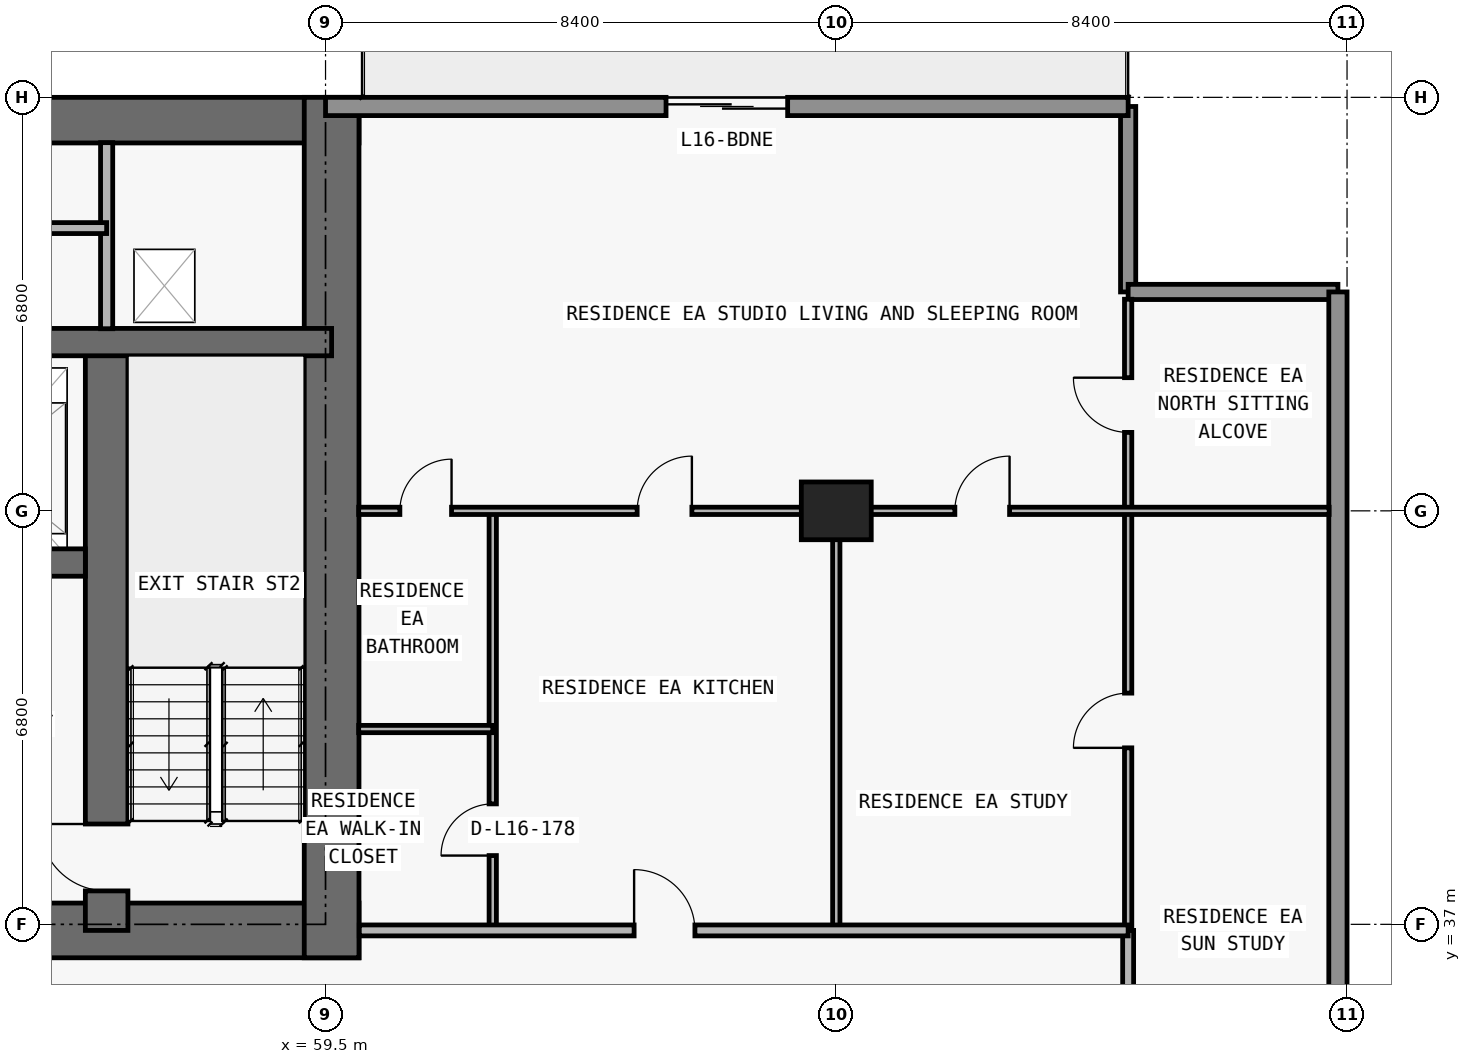
"""IFC4 building model, lengths in metres.
Left out: names, types, materials, properties, quantities, classifications, styles, units other than length and angle.
Written with IfcOpenShell. Run it as: python <this file> out.ifc"""

import sys

from ifc_helpers import new_model, si_unit, direction, frame, frame_2d, origin, origin_2d, place, context, subcontext, project, spatial, rectangle, extrude, element, fill, save


model = new_model("IFC4")
c1 = context("Model", 3, precision=1e-05, world=origin(), true_north=direction((0.0, 1.0)))
c2 = subcontext(c1, "Body", "Model", "MODEL_VIEW")
j1 = project(units=[si_unit("LENGTHUNIT", "METRE"), si_unit("PLANEANGLEUNIT", "RADIAN")], contexts=[c1])
p1 = place(None, origin())
s1 = spatial("IfcSite", under=j1, at=p1, CompositionType="ELEMENT")
p2 = place(p1, origin())
s2 = spatial("IfcBuilding", under=s1, at=p2, CompositionType="ELEMENT")
p3 = place(p2, frame((0.0, 0.0, 63.0)))
s3 = spatial("IfcBuildingStorey", under=s2, at=p3, CompositionType="ELEMENT", Elevation=63.0)
p4 = place(p3, frame((67.9, 43.8, 0.0), z_axis=(0.0, 0.0, 1.0), x_axis=(1.0, 0.0, 0.0)))
e1 = element("IfcColumn", 1, at=p4, inside=s3, PredefinedType="COLUMN", context=c2, shape_type="SweptSolid", body=[
    extrude(rectangle(XDim=1.15, YDim=0.95, at=origin_2d()), origin(), (0.0, 0.0, 1.0), 3.05),
])
p5 = place(p3, frame((17.75, 36.9, 0.0), z_axis=(0.0, 0.0, 1.0), x_axis=(1.0, 0.0, 0.0)))
e2 = element("IfcWall", 2, at=p5, inside=s3, PredefinedType="SHEAR", context=c2, shape_type="SweptSolid", body=[
    extrude(rectangle(XDim=42.3, YDim=0.9, at=frame_2d((21.15, 0.0))), origin(), (0.0, 0.0, 1.0), 3.05),
])
p6 = place(p5, frame((14.55, 0.0, 0.0)))
e3 = element("IfcOpeningElement", 3, at=p6, cuts=e2, PredefinedType="OPENING", context=c2, shape_type="SweptSolid", body=[
    extrude(rectangle(XDim=1.1, YDim=2.15, at=frame_2d((0.55, 1.075))), frame((0.0, 0.46, 0.0), z_axis=(0.0, -1.0, 0.0), x_axis=(1.0, 0.0, 0.0)), (0.0, 0.0, 1.0), 0.92),
])
p7 = place(p5, frame((6.4, 0.0, 0.0)))
e4 = element("IfcOpeningElement", 4, at=p7, cuts=e2, PredefinedType="OPENING", context=c2, shape_type="SweptSolid", body=[
    extrude(rectangle(XDim=1.05, YDim=2.15, at=frame_2d((0.525, 1.075))), frame((0.0, 0.46, 0.0), z_axis=(0.0, -1.0, 0.0), x_axis=(1.0, 0.0, 0.0)), (0.0, 0.0, 1.0), 0.92),
])
p8 = place(p5, frame((34.9, 0.0, 0.0)))
e5 = element("IfcOpeningElement", 5, at=p8, cuts=e2, PredefinedType="OPENING", context=c2, shape_type="SweptSolid", body=[
    extrude(rectangle(XDim=1.05, YDim=2.15, at=frame_2d((0.525, 1.075))), frame((0.0, 0.46, 0.0), z_axis=(0.0, -1.0, 0.0), x_axis=(1.0, 0.0, 0.0)), (0.0, 0.0, 1.0), 0.92),
])
p9 = place(p5, frame((11.012, 0.0, 0.0)))
e6 = element("IfcOpeningElement", 6, at=p9, cuts=e2, PredefinedType="OPENING", context=c2, shape_type="SweptSolid", body=[
    extrude(rectangle(XDim=1.05, YDim=2.15, at=frame_2d((0.525, 1.075))), frame((0.0, 0.46, 0.0), z_axis=(0.0, -1.0, 0.0), x_axis=(1.0, 0.0, 0.0)), (0.0, 0.0, 1.0), 0.92),
])
p10 = place(p5, frame((24.25, 0.0, 0.0)))
e7 = element("IfcOpeningElement", 7, at=p10, cuts=e2, PredefinedType="OPENING", context=c2, shape_type="SweptSolid", body=[
    extrude(rectangle(XDim=1.05, YDim=2.15, at=frame_2d((0.525, 1.075))), frame((0.0, 0.46, 0.0), z_axis=(0.0, -1.0, 0.0), x_axis=(1.0, 0.0, 0.0)), (0.0, 0.0, 1.0), 0.92),
])
p11 = place(p3, frame((17.75, 50.225, 0.0), z_axis=(0.0, 0.0, 1.0), x_axis=(1.0, 0.0, 0.0)))
e8 = element("IfcWall", 8, at=p11, inside=s3, PredefinedType="SHEAR", context=c2, shape_type="SweptSolid", body=[
    extrude(rectangle(XDim=42.3, YDim=0.75, at=frame_2d((21.15, 0.0))), origin(), (0.0, 0.0, 1.0), 3.05),
])
p12 = place(p3, frame((59.6, 36.45, 0.0), z_axis=(0.0, 0.0, 1.0), x_axis=(0.0, 1.0, 0.0)))
e9 = element("IfcWall", 9, at=p12, inside=s3, PredefinedType="SHEAR", context=c2, shape_type="SweptSolid", body=[
    extrude(rectangle(XDim=14.15, YDim=0.9, at=frame_2d((7.075, 0.0))), origin(), (0.0, 0.0, 1.0), 3.05),
])
p13 = place(p3, frame((55.9, 36.9, 0.0), z_axis=(0.0, 0.0, 1.0), x_axis=(0.0, 1.0, 0.0)))
e10 = element("IfcWall", 10, at=p13, inside=s3, PredefinedType="SHEAR", context=c2, shape_type="SweptSolid", body=[
    extrude(rectangle(XDim=9.675, YDim=0.7, at=frame_2d((4.837, 0.0))), origin(), (0.0, 0.0, 1.0), 3.05),
])
p14 = place(p13, frame((0.65, 0.0, 0.0)))
e11 = element("IfcOpeningElement", 11, at=p14, cuts=e10, PredefinedType="OPENING", context=c2, shape_type="SweptSolid", body=[
    extrude(rectangle(XDim=1.1, YDim=2.15, at=frame_2d((0.55, 1.075))), frame((0.0, 0.36, 0.0), z_axis=(0.0, -1.0, 0.0), x_axis=(1.0, 0.0, 0.0)), (0.0, 0.0, 1.0), 0.72),
])
p15 = place(p3, frame((22.25, 42.95, 0.0), z_axis=(0.0, 0.0, 1.0), x_axis=(1.0, 0.0, 0.0)))
e12 = element("IfcWall", 12, at=p15, inside=s3, PredefinedType="SHEAR", context=c2, shape_type="SweptSolid", body=[
    extrude(rectangle(XDim=33.3, YDim=0.45, at=frame_2d((16.65, 0.0))), origin(), (0.0, 0.0, 1.0), 3.05),
])
p16 = place(p15, frame((1.05, 0.0, 0.0)))
e13 = element("IfcOpeningElement", 13, at=p16, cuts=e12, PredefinedType="OPENING", context=c2, shape_type="SweptSolid", body=[
    extrude(rectangle(XDim=1.2, YDim=2.2, at=frame_2d((0.6, 1.1))), frame((0.0, 0.235, 0.0), z_axis=(0.0, -1.0, 0.0), x_axis=(1.0, 0.0, 0.0)), (0.0, 0.0, 1.0), 0.47),
])
p17 = place(p15, frame((31.05, 0.0, 0.0)))
e14 = element("IfcOpeningElement", 14, at=p17, cuts=e12, PredefinedType="OPENING", context=c2, shape_type="SweptSolid", body=[
    extrude(rectangle(XDim=1.2, YDim=2.2, at=frame_2d((0.6, 1.1))), frame((0.0, 0.235, 0.0), z_axis=(0.0, -1.0, 0.0), x_axis=(1.0, 0.0, 0.0)), (0.0, 0.0, 1.0), 0.47),
])
p18 = place(p15, frame((13.5, 0.0, 0.0)))
e15 = element("IfcOpeningElement", 15, at=p18, cuts=e12, PredefinedType="OPENING", context=c2, shape_type="SweptSolid", body=[
    extrude(rectangle(XDim=1.1, YDim=2.2, at=frame_2d((0.55, 1.1))), frame((0.0, 0.235, 0.0), z_axis=(0.0, -1.0, 0.0), x_axis=(1.0, 0.0, 0.0)), (0.0, 0.0, 1.0), 0.47),
])
p19 = place(p15, frame((16.1, 0.0, 0.0)))
e16 = element("IfcOpeningElement", 16, at=p19, cuts=e12, PredefinedType="OPENING", context=c2, shape_type="SweptSolid", body=[
    extrude(rectangle(XDim=1.1, YDim=2.2, at=frame_2d((0.55, 1.1))), frame((0.0, 0.235, 0.0), z_axis=(0.0, -1.0, 0.0), x_axis=(1.0, 0.0, 0.0)), (0.0, 0.0, 1.0), 0.47),
])
p20 = place(p15, frame((18.7, 0.0, 0.0)))
e17 = element("IfcOpeningElement", 17, at=p20, cuts=e12, PredefinedType="OPENING", context=c2, shape_type="SweptSolid", body=[
    extrude(rectangle(XDim=1.1, YDim=2.2, at=frame_2d((0.55, 1.1))), frame((0.0, 0.235, 0.0), z_axis=(0.0, -1.0, 0.0), x_axis=(1.0, 0.0, 0.0)), (0.0, 0.0, 1.0), 0.47),
])
p21 = place(p15, frame((3.625, 0.0, 0.0)))
e18 = element("IfcOpeningElement", 18, at=p21, cuts=e12, PredefinedType="OPENING", context=c2, shape_type="SweptSolid", body=[
    extrude(rectangle(XDim=1.05, YDim=2.15, at=frame_2d((0.525, 1.075))), frame((0.0, 0.235, 0.0), z_axis=(0.0, -1.0, 0.0), x_axis=(1.0, 0.0, 0.0)), (0.0, 0.0, 1.0), 0.47),
])
p22 = place(p15, frame((28.675, 0.0, 0.0)))
e19 = element("IfcOpeningElement", 19, at=p22, cuts=e12, PredefinedType="OPENING", context=c2, shape_type="SweptSolid", body=[
    extrude(rectangle(XDim=1.05, YDim=2.15, at=frame_2d((0.525, 1.075))), frame((0.0, 0.235, 0.0), z_axis=(0.0, -1.0, 0.0), x_axis=(1.0, 0.0, 0.0)), (0.0, 0.0, 1.0), 0.47),
])
p23 = place(p3, frame((18.2, 46.575, 0.0), z_axis=(0.0, 0.0, 1.0), x_axis=(1.0, 0.0, 0.0)))
e20 = element("IfcWall", 20, at=p23, inside=s3, PredefinedType="SHEAR", context=c2, shape_type="SweptSolid", body=[
    extrude(rectangle(XDim=41.4, YDim=0.45, at=frame_2d((20.7, 0.0))), origin(), (0.0, 0.0, 1.0), 3.05),
])
p24 = place(p23, frame((7.675, 0.0, 0.0)))
e21 = element("IfcOpeningElement", 21, at=p24, cuts=e20, PredefinedType="OPENING", context=c2, shape_type="SweptSolid", body=[
    extrude(rectangle(XDim=1.05, YDim=2.15, at=frame_2d((0.525, 1.075))), frame((0.0, 0.235, 0.0), z_axis=(0.0, -1.0, 0.0), x_axis=(1.0, 0.0, 0.0)), (0.0, 0.0, 1.0), 0.47),
])
p25 = place(p23, frame((32.725, 0.0, 0.0)))
e22 = element("IfcOpeningElement", 22, at=p25, cuts=e20, PredefinedType="OPENING", context=c2, shape_type="SweptSolid", body=[
    extrude(rectangle(XDim=1.05, YDim=2.15, at=frame_2d((0.525, 1.075))), frame((0.0, 0.235, 0.0), z_axis=(0.0, -1.0, 0.0), x_axis=(1.0, 0.0, 0.0)), (0.0, 0.0, 1.0), 0.47),
])
p26 = place(p3, frame((72.7, 50.45, 0.0), z_axis=(0.0, 0.0, 1.0), x_axis=(0.0, -1.0, 0.0)))
e23 = element("IfcWall", 23, at=p26, inside=s3, PredefinedType="ELEMENTEDWALL", context=c2, shape_type="SweptSolid", body=[
    extrude(rectangle(XDim=3.05, YDim=0.25, at=frame_2d((1.525, 0.0))), origin(), (0.0, 0.0, 1.0), 3.05),
])
p27 = place(p3, frame((72.7, 47.4, 0.0), z_axis=(0.0, 0.0, 1.0), x_axis=(1.0, 0.0, 0.0)))
e24 = element("IfcWall", 24, at=p27, inside=s3, PredefinedType="ELEMENTEDWALL", context=c2, shape_type="SweptSolid", body=[
    extrude(rectangle(XDim=3.45, YDim=0.25, at=frame_2d((1.725, 0.0))), origin(), (0.0, 0.0, 1.0), 3.05),
])
p28 = place(p3, frame((76.15, 47.4, 0.0), z_axis=(0.0, 0.0, 1.0), x_axis=(0.0, -1.0, 0.0)))
e25 = element("IfcWall", 25, at=p28, inside=s3, PredefinedType="STANDARD", context=c2, shape_type="SweptSolid", body=[
    extrude(rectangle(XDim=20.6, YDim=0.3, at=frame_2d((10.3, 0.0))), origin(), (0.0, 0.0, 1.0), 3.05),
])
p29 = place(p3, frame((59.5, 50.45, 0.0), z_axis=(0.0, 0.0, 1.0), x_axis=(1.0, 0.0, 0.0)))
e26 = element("IfcWall", 26, at=p29, inside=s3, PredefinedType="STANDARD", context=c2, shape_type="SweptSolid", body=[
    extrude(rectangle(XDim=13.2, YDim=0.3, at=frame_2d((6.6, 0.0))), origin(), (0.0, 0.0, 1.0), 3.05),
])
p30 = place(p29, frame((5.6, 0.0, 0.0)))
e27 = element("IfcOpeningElement", 27, at=p30, cuts=e26, PredefinedType="OPENING", context=c2, shape_type="SweptSolid", body=[
    extrude(rectangle(XDim=2.0, YDim=2.3, at=frame_2d((1.0, 1.15))), frame((0.0, 0.16, 0.0), z_axis=(0.0, -1.0, 0.0), x_axis=(1.0, 0.0, 0.0)), (0.0, 0.0, 1.0), 0.32),
])
p31 = place(p3, frame((55.9, 46.795, 0.0), z_axis=(0.0, 0.0, 1.0), x_axis=(0.0, 1.0, 0.0)))
e28 = element("IfcWall", 28, at=p31, inside=s3, PredefinedType="PARTITIONING", context=c2, shape_type="SweptSolid", body=[
    extrude(rectangle(XDim=3.06, YDim=0.2, at=frame_2d((1.53, 0.0))), origin(), (0.0, 0.0, 1.0), 3.05),
])
p32 = place(p3, frame((62.25, 36.9, 0.0), z_axis=(0.0, 0.0, 1.0), x_axis=(0.0, 1.0, 0.0)))
e29 = element("IfcWall", 29, at=p32, inside=s3, PredefinedType="PARTITIONING", context=c2, shape_type="SweptSolid", body=[
    extrude(rectangle(XDim=6.9, YDim=0.12, at=frame_2d((3.45, 0.0))), origin(), (0.0, 0.0, 1.0), 2.486),
])
p33 = place(p32, frame((1.231, 0.0, 0.0)))
e30 = element("IfcOpeningElement", 30, at=p33, cuts=e29, PredefinedType="OPENING", context=c2, shape_type="SweptSolid", body=[
    extrude(rectangle(XDim=0.85, YDim=2.1, at=frame_2d((0.425, 1.05))), frame((0.0, 0.07, 0.0), z_axis=(0.0, -1.0, 0.0), x_axis=(1.0, 0.0, 0.0)), (0.0, 0.0, 1.0), 0.14),
])
p34 = place(p3, frame((67.9, 36.9, 0.0), z_axis=(0.0, 0.0, 1.0), x_axis=(0.0, 1.0, 0.0)))
e31 = element("IfcWall", 31, at=p34, inside=s3, PredefinedType="PARTITIONING", context=c2, shape_type="SweptSolid", body=[
    extrude(rectangle(XDim=6.9, YDim=0.12, at=frame_2d((3.45, 0.0))), origin(), (0.0, 0.0, 1.0), 2.11),
])
p35 = place(p3, frame((72.7, 33.805, 0.0), z_axis=(0.0, 0.0, 1.0), x_axis=(0.0, 1.0, 0.0)))
e32 = element("IfcWall", 32, at=p35, inside=s3, PredefinedType="PARTITIONING", context=c2, shape_type="SweptSolid", body=[
    extrude(rectangle(XDim=3.095, YDim=0.18, at=frame_2d((1.547, 0.0))), origin(), (0.0, 0.0, 1.0), 3.05),
])
p36 = place(p3, frame((72.7, 36.905, 0.0), z_axis=(0.0, 0.0, 1.0), x_axis=(0.0, 1.0, 0.0)))
e33 = element("IfcWall", 33, at=p36, inside=s3, PredefinedType="PARTITIONING", context=c2, shape_type="SweptSolid", body=[
    extrude(rectangle(XDim=10.375, YDim=0.12, at=frame_2d((5.188, 0.0))), origin(), (0.0, 0.0, 1.0), 3.05),
])
p37 = place(p36, frame((2.998, 0.0, 0.0)))
e34 = element("IfcOpeningElement", 34, at=p37, cuts=e33, PredefinedType="OPENING", context=c2, shape_type="SweptSolid", body=[
    extrude(rectangle(XDim=0.9, YDim=2.15, at=frame_2d((0.45, 1.075))), frame((0.0, 0.07, 0.0), z_axis=(0.0, -1.0, 0.0), x_axis=(1.0, 0.0, 0.0)), (0.0, 0.0, 1.0), 0.14),
])
p38 = place(p36, frame((8.185, 0.0, 0.0)))
e35 = element("IfcOpeningElement", 35, at=p38, cuts=e33, PredefinedType="OPENING", context=c2, shape_type="SweptSolid", body=[
    extrude(rectangle(XDim=0.9, YDim=2.15, at=frame_2d((0.45, 1.075))), frame((0.0, 0.07, 0.0), z_axis=(0.0, -1.0, 0.0), x_axis=(1.0, 0.0, 0.0)), (0.0, 0.0, 1.0), 0.14),
])
p39 = place(p3, frame((60.055, 36.9, 0.0), z_axis=(0.0, 0.0, 1.0), x_axis=(1.0, 0.0, 0.0)))
e36 = element("IfcWall", 36, at=p39, inside=s3, PredefinedType="PARTITIONING", context=c2, shape_type="SweptSolid", body=[
    extrude(rectangle(XDim=12.645, YDim=0.18, at=frame_2d((6.323, 0.0))), origin(), (0.0, 0.0, 1.0), 3.05),
])
p40 = place(p39, frame((4.52, 0.0, 0.0)))
e37 = element("IfcOpeningElement", 37, at=p40, cuts=e36, PredefinedType="OPENING", context=c2, shape_type="SweptSolid", body=[
    extrude(rectangle(XDim=1.0, YDim=2.2, at=frame_2d((0.5, 1.1))), frame((0.0, 0.1, 0.0), z_axis=(0.0, -1.0, 0.0), x_axis=(1.0, 0.0, 0.0)), (0.0, 0.0, 1.0), 0.2),
])
p41 = place(p3, frame((60.045, 40.212, 0.0), z_axis=(0.0, 0.0, 1.0), x_axis=(1.0, 0.0, 0.0)))
e38 = element("IfcWall", 38, at=p41, inside=s3, PredefinedType="PARTITIONING", context=c2, shape_type="SweptSolid", body=[
    extrude(rectangle(XDim=2.205, YDim=0.12, at=frame_2d((1.103, 0.0))), origin(), (0.0, 0.0, 1.0), 3.05),
])
p42 = place(p3, frame((60.045, 43.8, 0.0), z_axis=(0.0, 0.0, 1.0), x_axis=(1.0, 0.0, 0.0)))
e39 = element("IfcWall", 39, at=p42, inside=s3, PredefinedType="PARTITIONING", context=c2, shape_type="SweptSolid", body=[
    extrude(rectangle(XDim=15.96, YDim=0.12, at=frame_2d((7.98, 0.0))), origin(), (0.0, 0.0, 1.0), 2.339),
])
p43 = place(p42, frame((9.805, 0.0, 0.0)))
e40 = element("IfcOpeningElement", 40, at=p43, cuts=e39, PredefinedType="OPENING", context=c2, shape_type="SweptSolid", body=[
    extrude(rectangle(XDim=0.9, YDim=2.15, at=frame_2d((0.45, 1.075))), frame((0.0, 0.07, 0.0), z_axis=(0.0, -1.0, 0.0), x_axis=(1.0, 0.0, 0.0)), (0.0, 0.0, 1.0), 0.14),
])
p44 = place(p42, frame((4.58, 0.0, 0.0)))
e41 = element("IfcOpeningElement", 41, at=p44, cuts=e39, PredefinedType="OPENING", context=c2, shape_type="SweptSolid", body=[
    extrude(rectangle(XDim=0.9, YDim=2.15, at=frame_2d((0.45, 1.075))), frame((0.0, 0.07, 0.0), z_axis=(0.0, -1.0, 0.0), x_axis=(1.0, 0.0, 0.0)), (0.0, 0.0, 1.0), 0.14),
])
p45 = place(p42, frame((0.677, 0.0, 0.0)))
e42 = element("IfcOpeningElement", 42, at=p45, cuts=e39, PredefinedType="OPENING", context=c2, shape_type="SweptSolid", body=[
    extrude(rectangle(XDim=0.85, YDim=2.1, at=frame_2d((0.425, 1.05))), frame((0.0, 0.07, 0.0), z_axis=(0.0, -1.0, 0.0), x_axis=(1.0, 0.0, 0.0)), (0.0, 0.0, 1.0), 0.14),
])
p46 = place(p3, frame((26.7, 48.45, 0.0), z_axis=(0.0, 0.0, 1.0), x_axis=(1.0, 0.0, 0.0)))
e43 = element("IfcWall", 43, at=p46, inside=s3, PredefinedType="PARTITIONING", context=c2, shape_type="SweptSolid", body=[
    extrude(rectangle(XDim=29.2, YDim=0.18, at=frame_2d((14.6, 0.0))), origin(), (0.0, 0.0, 1.0), 3.05),
])
p47 = place(p46, frame((1.75, 0.0, 0.0)))
e44 = element("IfcOpeningElement", 44, at=p47, cuts=e43, PredefinedType="OPENING", context=c2, shape_type="SweptSolid", body=[
    extrude(rectangle(XDim=1.2, YDim=2.2, at=frame_2d((0.6, 1.1))), frame((0.0, 0.1, 0.0), z_axis=(0.0, -1.0, 0.0), x_axis=(1.0, 0.0, 0.0)), (0.0, 0.0, 1.0), 0.2),
])
p48 = place(p46, frame((6.475, 0.0, 0.0)))
e45 = element("IfcOpeningElement", 45, at=p48, cuts=e43, PredefinedType="OPENING", context=c2, shape_type="SweptSolid", body=[
    extrude(rectangle(XDim=1.2, YDim=2.2, at=frame_2d((0.6, 1.1))), frame((0.0, 0.1, 0.0), z_axis=(0.0, -1.0, 0.0), x_axis=(1.0, 0.0, 0.0)), (0.0, 0.0, 1.0), 0.2),
])
p49 = place(p46, frame((14.05, 0.0, 0.0)))
e46 = element("IfcOpeningElement", 46, at=p49, cuts=e43, PredefinedType="OPENING", context=c2, shape_type="SweptSolid", body=[
    extrude(rectangle(XDim=1.0, YDim=2.2, at=frame_2d((0.5, 1.1))), frame((0.0, 0.1, 0.0), z_axis=(0.0, -1.0, 0.0), x_axis=(1.0, 0.0, 0.0)), (0.0, 0.0, 1.0), 0.2),
])
p50 = place(p46, frame((21.425, 0.0, 0.0)))
e47 = element("IfcOpeningElement", 47, at=p50, cuts=e43, PredefinedType="OPENING", context=c2, shape_type="SweptSolid", body=[
    extrude(rectangle(XDim=1.2, YDim=2.2, at=frame_2d((0.6, 1.1))), frame((0.0, 0.1, 0.0), z_axis=(0.0, -1.0, 0.0), x_axis=(1.0, 0.0, 0.0)), (0.0, 0.0, 1.0), 0.2),
])
p51 = place(p46, frame((26.375, 0.0, 0.0)))
e48 = element("IfcOpeningElement", 48, at=p51, cuts=e43, PredefinedType="OPENING", context=c2, shape_type="SweptSolid", body=[
    extrude(rectangle(XDim=0.85, YDim=2.1, at=frame_2d((0.425, 1.05))), frame((0.0, 0.1, 0.0), z_axis=(0.0, -1.0, 0.0), x_axis=(1.0, 0.0, 0.0)), (0.0, 0.0, 1.0), 0.2),
])
p52 = place(p30, origin())
e49 = element("IfcDoor", 49, at=p52, inside=s3, OperationType="DOUBLE_DOOR_SLIDING", PredefinedType="DOOR", context=c2, shape_type="SweptSolid", body=[
    extrude(rectangle(XDim=2.0, YDim=2.3, at=frame_2d((1.0, 1.15))), frame((0.0, 0.025, 0.0), z_axis=(0.0, -1.0, 0.0), x_axis=(1.0, 0.0, 0.0)), (0.0, 0.0, 1.0), 0.05),
])
fill(e27, e49)
p53 = place(p14, origin())
e50 = element("IfcDoor", 50, at=p53, inside=s3, OperationType="SINGLE_SWING_RIGHT", PredefinedType="DOOR", context=c2, shape_type="SweptSolid", body=[
    extrude(rectangle(XDim=1.1, YDim=2.15, at=frame_2d((0.55, 1.075))), frame((0.0, 0.025, 0.0), z_axis=(0.0, -1.0, 0.0), x_axis=(1.0, 0.0, 0.0)), (0.0, 0.0, 1.0), 0.05),
])
fill(e11, e50)
p54 = place(p43, origin())
e51 = element("IfcDoor", 51, at=p54, inside=s3, OperationType="SINGLE_SWING_RIGHT", PredefinedType="DOOR", context=c2, shape_type="SweptSolid", body=[
    extrude(rectangle(XDim=0.9, YDim=2.15, at=frame_2d((0.45, 1.075))), frame((0.0, 0.025, 0.0), z_axis=(0.0, -1.0, 0.0), x_axis=(1.0, 0.0, 0.0)), (0.0, 0.0, 1.0), 0.05),
])
fill(e40, e51)
p55 = place(p40, origin())
e52 = element("IfcDoor", 52, at=p55, inside=s3, OperationType="SINGLE_SWING_LEFT", PredefinedType="DOOR", context=c2, shape_type="SweptSolid", body=[
    extrude(rectangle(XDim=1.0, YDim=2.2, at=frame_2d((0.5, 1.1))), frame((0.0, 0.025, 0.0), z_axis=(0.0, -1.0, 0.0), x_axis=(1.0, 0.0, 0.0)), (0.0, 0.0, 1.0), 0.05),
])
fill(e37, e52)
p56 = place(p44, origin())
e53 = element("IfcDoor", 53, at=p56, inside=s3, OperationType="SINGLE_SWING_RIGHT", PredefinedType="DOOR", context=c2, shape_type="SweptSolid", body=[
    extrude(rectangle(XDim=0.9, YDim=2.15, at=frame_2d((0.45, 1.075))), frame((0.0, 0.025, 0.0), z_axis=(0.0, -1.0, 0.0), x_axis=(1.0, 0.0, 0.0)), (0.0, 0.0, 1.0), 0.05),
])
fill(e41, e53)
p57 = place(p33, origin())
e54 = element("IfcDoor", 54, at=p57, inside=s3, OperationType="SINGLE_SWING_LEFT", PredefinedType="DOOR", context=c2, shape_type="SweptSolid", body=[
    extrude(rectangle(XDim=0.85, YDim=2.1, at=frame_2d((0.425, 1.05))), frame((0.0, 0.025, 0.0), z_axis=(0.0, -1.0, 0.0), x_axis=(1.0, 0.0, 0.0)), (0.0, 0.0, 1.0), 0.05),
])
fill(e30, e54)
p58 = place(p45, origin())
e55 = element("IfcDoor", 55, at=p58, inside=s3, OperationType="SINGLE_SWING_RIGHT", PredefinedType="DOOR", context=c2, shape_type="SweptSolid", body=[
    extrude(rectangle(XDim=0.85, YDim=2.1, at=frame_2d((0.425, 1.05))), frame((0.0, 0.025, 0.0), z_axis=(0.0, -1.0, 0.0), x_axis=(1.0, 0.0, 0.0)), (0.0, 0.0, 1.0), 0.05),
])
fill(e42, e55)
p59 = place(p37, origin())
e56 = element("IfcDoor", 56, at=p59, inside=s3, OperationType="SINGLE_SWING_LEFT", PredefinedType="DOOR", context=c2, shape_type="SweptSolid", body=[
    extrude(rectangle(XDim=0.9, YDim=2.15, at=frame_2d((0.45, 1.075))), frame((0.0, 0.025, 0.0), z_axis=(0.0, -1.0, 0.0), x_axis=(1.0, 0.0, 0.0)), (0.0, 0.0, 1.0), 0.05),
])
fill(e34, e56)
p60 = place(p38, origin())
e57 = element("IfcDoor", 57, at=p60, inside=s3, OperationType="SINGLE_SWING_RIGHT", PredefinedType="DOOR", context=c2, shape_type="SweptSolid", body=[
    extrude(rectangle(XDim=0.9, YDim=2.15, at=frame_2d((0.45, 1.075))), frame((0.0, 0.025, 0.0), z_axis=(0.0, -1.0, 0.0), x_axis=(1.0, 0.0, 0.0)), (0.0, 0.0, 1.0), 0.05),
])
fill(e35, e57)
save(model, sys.argv[1])
